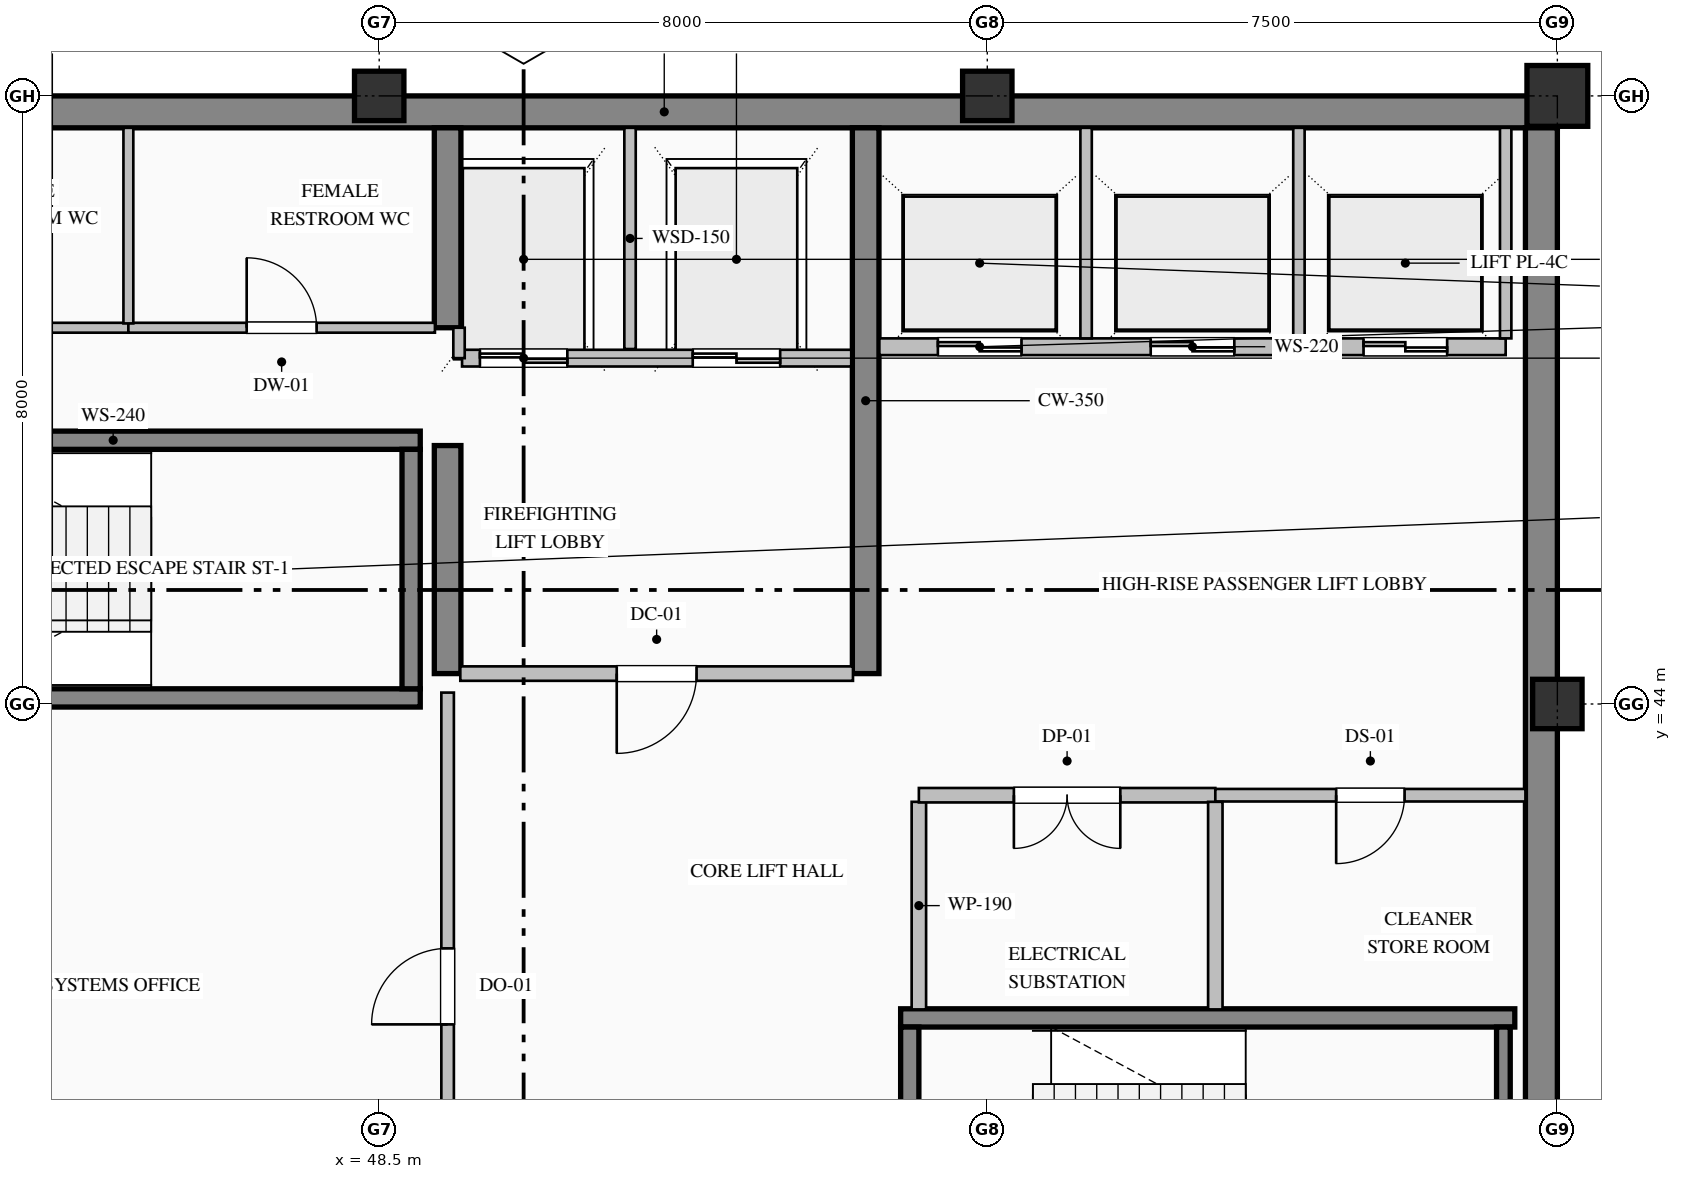
"""IFC4 building model, lengths in metres.
Left out: names, types, materials, properties, quantities, classifications, styles, units other than length and angle.
Written with IfcOpenShell. Run it as: python <this file> out.ifc"""

import sys

from ifc_helpers import new_model, si_unit, direction, frame, frame_2d, origin, origin_2d, place, context, subcontext, project, spatial, rectangle, hollow_rectangle, extrude, element, fill, save


model = new_model("IFC4")
c1 = context("Model", 3, precision=1e-05, world=origin(), true_north=direction((0.0, 1.0)))
c2 = subcontext(c1, "Body", "Model", "MODEL_VIEW")
j1 = project(units=[si_unit("LENGTHUNIT", "METRE"), si_unit("PLANEANGLEUNIT", "RADIAN")], contexts=[c1])
p1 = place(None, origin())
s1 = spatial("IfcSite", under=j1, at=p1, CompositionType="ELEMENT")
p2 = place(p1, origin())
s2 = spatial("IfcBuilding", under=s1, at=p2, CompositionType="ELEMENT")
p3 = place(p2, frame((0.0, 0.0, 363.2)))
s3 = spatial("IfcBuildingStorey", under=s2, at=p3, CompositionType="ELEMENT", Elevation=363.2)
p4 = place(p3, frame((40.5, 51.79, 0.0), z_axis=(0.0, 0.0, 1.0), x_axis=(1.0, 0.0, 0.0)))
e1 = element("IfcWall", 1, at=p4, inside=s3, PredefinedType="SHEAR", context=c2, shape_type="SweptSolid", body=[
    extrude(rectangle(XDim=23.5, YDim=0.42, at=frame_2d((11.75, 0.0))), origin(), (0.0, 0.0, 1.0), 3.58),
])
p5 = place(p3, frame((63.79, 36.32, 0.0), z_axis=(0.0, 0.0, 1.0), x_axis=(0.0, 1.0, 0.0)))
e2 = element("IfcWall", 2, at=p5, inside=s3, PredefinedType="SHEAR", context=c2, shape_type="SweptSolid", body=[
    extrude(rectangle(XDim=15.26, YDim=0.42, at=frame_2d((7.63, 0.0))), origin(), (0.0, 0.0, 1.0), 3.58),
])
p6 = place(p3, frame((49.4, 44.4, 0.0), z_axis=(0.0, 0.0, 1.0), x_axis=(0.0, 1.0, 0.0)))
e3 = element("IfcWall", 3, at=p6, inside=s3, PredefinedType="SHEAR", context=c2, shape_type="SweptSolid", body=[
    extrude(rectangle(XDim=3.0, YDim=0.35, at=frame_2d((1.5, 0.0))), origin(), (0.0, 0.0, 1.0), 3.58),
])
p7 = place(p3, frame((49.4, 48.95, 0.0), z_axis=(0.0, 0.0, 1.0), x_axis=(0.0, 1.0, 0.0)))
e4 = element("IfcWall", 4, at=p7, inside=s3, PredefinedType="SHEAR", context=c2, shape_type="SweptSolid", body=[
    extrude(rectangle(XDim=2.63, YDim=0.35, at=frame_2d((1.315, 0.0))), origin(), (0.0, 0.0, 1.0), 3.58),
])
p8 = place(p3, frame((54.9, 44.4, 0.0), z_axis=(0.0, 0.0, 1.0), x_axis=(0.0, 1.0, 0.0)))
e5 = element("IfcWall", 5, at=p8, inside=s3, PredefinedType="SHEAR", context=c2, shape_type="SweptSolid", body=[
    extrude(rectangle(XDim=7.18, YDim=0.35, at=frame_2d((3.59, 0.0))), origin(), (0.0, 0.0, 1.0), 3.58),
])
for number, where, z_axis, x_axis in (
    (6, (48.5, 52.0, 0.0), (0.0, 0.0, 1.0), (1.0, 0.0, 0.0)),
    (7, (56.5, 52.0, 0.0), (0.0, 0.0, 1.0), (1.0, 0.0, 0.0)),
    (8, (64.0, 44.0, 0.0), (0.0, 0.0, 1.0), (1.0, 0.0, 0.0)),
):
    element("IfcColumn", number, at=place(p3, frame(where, z_axis=z_axis, x_axis=x_axis)), inside=s3, PredefinedType="COLUMN", context=c2, shape_type="SweptSolid", body=[
        extrude(hollow_rectangle(XDim=0.65, YDim=0.65, WallThickness=0.028, at=origin_2d()), origin(), (0.0, 0.0, 1.0), 4.0),
    ])
p9 = place(p3, frame((64.0, 52.0, 0.0), z_axis=(0.0, 0.0, 1.0), x_axis=(1.0, 0.0, 0.0)))
e9 = element("IfcColumn", 9, at=p9, inside=s3, PredefinedType="COLUMN", context=c2, shape_type="SweptSolid", body=[
    extrude(hollow_rectangle(XDim=0.8, YDim=0.8, WallThickness=0.032, at=origin_2d()), origin(), (0.0, 0.0, 1.0), 4.0),
])
for number, where, z_axis, x_axis in (
    (10, (40.96, 47.47, 0.0), (0.0, 0.0, 1.0), (1.0, 0.0, 0.0)),
    (11, (49.04, 44.08, 0.0), (0.0, 0.0, 1.0), (-1.0, 0.0, 0.0)),
):
    element("IfcWall", number, at=place(p3, frame(where, z_axis=z_axis, x_axis=x_axis)), inside=s3, PredefinedType="SOLIDWALL", context=c2, shape_type="SweptSolid", body=[
        extrude(rectangle(XDim=8.08, YDim=0.24, at=frame_2d((4.04, 0.0))), origin(), (0.0, 0.0, 1.0), 4.0),
    ])
p10 = place(p3, frame((48.92, 44.2, 0.0), z_axis=(0.0, 0.0, 1.0), x_axis=(0.0, 1.0, 0.0)))
e12 = element("IfcWall", 12, at=p10, inside=s3, PredefinedType="SOLIDWALL", context=c2, shape_type="SweptSolid", body=[
    extrude(rectangle(XDim=3.15, YDim=0.24, at=frame_2d((1.575, 0.0))), origin(), (0.0, 0.0, 1.0), 4.0),
])
p11 = place(p3, frame((55.36, 39.87, 0.0), z_axis=(0.0, 0.0, 1.0), x_axis=(1.0, 0.0, 0.0)))
e13 = element("IfcWall", 13, at=p11, inside=s3, PredefinedType="SOLIDWALL", context=c2, shape_type="SweptSolid", body=[
    extrude(rectangle(XDim=8.08, YDim=0.24, at=frame_2d((4.04, 0.0))), origin(), (0.0, 0.0, 1.0), 4.0),
])
p12 = place(p3, frame((55.48, 39.75, 0.0), z_axis=(0.0, 0.0, 1.0), x_axis=(0.0, -1.0, 0.0)))
e14 = element("IfcWall", 14, at=p12, inside=s3, PredefinedType="SOLIDWALL", context=c2, shape_type="SweptSolid", body=[
    extrude(rectangle(XDim=3.15, YDim=0.24, at=frame_2d((1.575, 0.0))), origin(), (0.0, 0.0, 1.0), 4.0),
])
p13 = place(p12, frame((1.0, 0.0, 0.0)))
e15 = element("IfcOpeningElement", 15, at=p13, cuts=e14, PredefinedType="OPENING", context=c2, shape_type="SweptSolid", body=[
    extrude(rectangle(XDim=1.15, YDim=2.2, at=frame_2d((0.575, 1.1))), frame((0.0, 0.13, 0.0), z_axis=(0.0, -1.0, 0.0), x_axis=(1.0, 0.0, 0.0)), (0.0, 0.0, 1.0), 0.26),
])
p14 = place(p3, frame((63.29, 36.6, 0.0), z_axis=(0.0, 0.0, 1.0), x_axis=(0.0, 1.0, 0.0)))
e16 = element("IfcWall", 16, at=p14, inside=s3, PredefinedType="SOLIDWALL", context=c2, shape_type="SweptSolid", body=[
    extrude(rectangle(XDim=3.15, YDim=0.18, at=frame_2d((1.575, 0.0))), origin(), (0.0, 0.0, 1.0), 4.0),
])
p15 = place(p3, frame((54.71, 48.55, 0.0), z_axis=(0.0, 0.0, 1.0), x_axis=(-1.0, 0.0, 0.0)))
e17 = element("IfcWall", 17, at=p15, inside=s3, PredefinedType="PARTITIONING", context=c2, shape_type="SweptSolid", body=[
    extrude(rectangle(XDim=5.12, YDim=0.22, at=frame_2d((2.56, 0.0))), origin(), (0.0, 0.0, 1.0), 3.58),
])
p16 = place(p15, frame((3.735, 0.0, 0.0)))
e18 = element("IfcOpeningElement", 18, at=p16, cuts=e17, PredefinedType="OPENING", context=c2, shape_type="SweptSolid", body=[
    extrude(rectangle(XDim=1.15, YDim=2.2, at=frame_2d((0.575, 1.1))), frame((0.0, 0.12, 0.0), z_axis=(0.0, -1.0, 0.0), x_axis=(1.0, 0.0, 0.0)), (0.0, 0.0, 1.0), 0.24),
])
p17 = place(p15, frame((0.935, 0.0, 0.0)))
e19 = element("IfcOpeningElement", 19, at=p17, cuts=e17, PredefinedType="OPENING", context=c2, shape_type="SweptSolid", body=[
    extrude(rectangle(XDim=1.15, YDim=2.2, at=frame_2d((0.575, 1.1))), frame((0.0, 0.12, 0.0), z_axis=(0.0, -1.0, 0.0), x_axis=(1.0, 0.0, 0.0)), (0.0, 0.0, 1.0), 0.24),
])
p18 = place(p3, frame((51.8, 48.67, 0.0), z_axis=(0.0, 0.0, 1.0), x_axis=(0.0, 1.0, 0.0)))
e20 = element("IfcWall", 20, at=p18, inside=s3, PredefinedType="PARTITIONING", context=c2, shape_type="SweptSolid", body=[
    extrude(rectangle(XDim=2.91, YDim=0.15, at=frame_2d((1.455, 0.0))), origin(), (0.0, 0.0, 1.0), 3.58),
])
p19 = place(p3, frame((49.55, 48.55, 0.0), z_axis=(0.0, 0.0, 1.0), x_axis=(0.0, 1.0, 0.0)))
e21 = element("IfcWall", 21, at=p19, inside=s3, PredefinedType="PARTITIONING", context=c2, shape_type="SweptSolid", body=[
    extrude(rectangle(XDim=0.4, YDim=0.15, at=frame_2d((0.2, 0.0))), origin(), (0.0, 0.0, 1.0), 3.58),
])
p20 = place(p3, frame((63.32, 48.7, 0.0), z_axis=(0.0, 0.0, 1.0), x_axis=(-1.0, 0.0, 0.0)))
e22 = element("IfcWall", 22, at=p20, inside=s3, PredefinedType="PARTITIONING", context=c2, shape_type="SweptSolid", body=[
    extrude(rectangle(XDim=8.24, YDim=0.22, at=frame_2d((4.12, 0.0))), origin(), (0.0, 0.0, 1.0), 3.58),
])
p21 = place(p20, frame((6.37, 0.0, 0.0)))
e23 = element("IfcOpeningElement", 23, at=p21, cuts=e22, PredefinedType="OPENING", context=c2, shape_type="SweptSolid", body=[
    extrude(rectangle(XDim=1.1, YDim=2.2, at=frame_2d((0.55, 1.1))), frame((0.0, 0.12, 0.0), z_axis=(0.0, -1.0, 0.0), x_axis=(1.0, 0.0, 0.0)), (0.0, 0.0, 1.0), 0.24),
])
p22 = place(p20, frame((3.57, 0.0, 0.0)))
e24 = element("IfcOpeningElement", 24, at=p22, cuts=e22, PredefinedType="OPENING", context=c2, shape_type="SweptSolid", body=[
    extrude(rectangle(XDim=1.1, YDim=2.2, at=frame_2d((0.55, 1.1))), frame((0.0, 0.12, 0.0), z_axis=(0.0, -1.0, 0.0), x_axis=(1.0, 0.0, 0.0)), (0.0, 0.0, 1.0), 0.24),
])
p23 = place(p20, frame((0.77, 0.0, 0.0)))
e25 = element("IfcOpeningElement", 25, at=p23, cuts=e22, PredefinedType="OPENING", context=c2, shape_type="SweptSolid", body=[
    extrude(rectangle(XDim=1.1, YDim=2.2, at=frame_2d((0.55, 1.1))), frame((0.0, 0.12, 0.0), z_axis=(0.0, -1.0, 0.0), x_axis=(1.0, 0.0, 0.0)), (0.0, 0.0, 1.0), 0.24),
])
for number, where, z_axis, x_axis in (
    (26, (57.8, 48.81, 0.0), (0.0, 0.0, 1.0), (0.0, 1.0, 0.0)),
    (27, (60.6, 48.81, 0.0), (0.0, 0.0, 1.0), (0.0, 1.0, 0.0)),
    (28, (63.32, 48.81, 0.0), (0.0, 0.0, 1.0), (0.0, 1.0, 0.0)),
):
    element("IfcWall", number, at=place(p3, frame(where, z_axis=z_axis, x_axis=x_axis)), inside=s3, PredefinedType="PARTITIONING", context=c2, shape_type="SweptSolid", body=[
        extrude(rectangle(XDim=2.77, YDim=0.15, at=frame_2d((1.385, 0.0))), origin(), (0.0, 0.0, 1.0), 3.58),
    ])
p24 = place(p3, frame((40.92, 48.95, 0.0), z_axis=(0.0, 0.0, 1.0), x_axis=(1.0, 0.0, 0.0)))
e29 = element("IfcWall", 29, at=p24, inside=s3, PredefinedType="PARTITIONING", context=c2, shape_type="SweptSolid", body=[
    extrude(rectangle(XDim=4.28, YDim=0.13, at=frame_2d((2.14, 0.0))), origin(), (0.0, 0.0, 1.0), 3.58),
])
p25 = place(p24, frame((1.68, 0.0, 0.0)))
e30 = element("IfcOpeningElement", 30, at=p25, cuts=e29, PredefinedType="OPENING", context=c2, shape_type="SweptSolid", body=[
    extrude(rectangle(XDim=0.92, YDim=2.15, at=frame_2d((0.46, 1.075))), frame((0.0, 0.075, 0.0), z_axis=(0.0, -1.0, 0.0), x_axis=(1.0, 0.0, 0.0)), (0.0, 0.0, 1.0), 0.15),
])
p26 = place(p3, frame((45.2, 48.95, 0.0), z_axis=(0.0, 0.0, 1.0), x_axis=(1.0, 0.0, 0.0)))
e31 = element("IfcWall", 31, at=p26, inside=s3, PredefinedType="PARTITIONING", context=c2, shape_type="SweptSolid", body=[
    extrude(rectangle(XDim=4.033, YDim=0.13, at=frame_2d((2.017, 0.0))), origin(), (0.0, 0.0, 1.0), 3.58),
])
p27 = place(p26, frame((1.556, 0.0, 0.0)))
e32 = element("IfcOpeningElement", 32, at=p27, cuts=e31, PredefinedType="OPENING", context=c2, shape_type="SweptSolid", body=[
    extrude(rectangle(XDim=0.92, YDim=2.15, at=frame_2d((0.46, 1.075))), frame((0.0, 0.075, 0.0), z_axis=(0.0, -1.0, 0.0), x_axis=(1.0, 0.0, 0.0)), (0.0, 0.0, 1.0), 0.15),
])
p28 = place(p3, frame((54.733, 44.4, 0.0), z_axis=(0.0, 0.0, 1.0), x_axis=(-1.0, 0.0, 0.0)))
e33 = element("IfcWall", 33, at=p28, inside=s3, PredefinedType="PARTITIONING", context=c2, shape_type="SweptSolid", body=[
    extrude(rectangle(XDim=5.166, YDim=0.19, at=frame_2d((2.583, 0.0))), origin(), (0.0, 0.0, 1.0), 3.58),
])
p29 = place(p28, frame((2.058, 0.0, 0.0)))
e34 = element("IfcOpeningElement", 34, at=p29, cuts=e33, PredefinedType="OPENING", context=c2, shape_type="SweptSolid", body=[
    extrude(rectangle(XDim=1.05, YDim=2.15, at=frame_2d((0.525, 1.075))), frame((0.0, 0.105, 0.0), z_axis=(0.0, -1.0, 0.0), x_axis=(1.0, 0.0, 0.0)), (0.0, 0.0, 1.0), 0.21),
])
p30 = place(p3, frame((49.4, 36.42, 0.0), z_axis=(0.0, 0.0, 1.0), x_axis=(0.0, 1.0, 0.0)))
e35 = element("IfcWall", 35, at=p30, inside=s3, PredefinedType="PARTITIONING", context=c2, shape_type="SweptSolid", body=[
    extrude(rectangle(XDim=7.73, YDim=0.165, at=frame_2d((3.865, 0.0))), origin(), (0.0, 0.0, 1.0), 2.822),
])
p31 = place(p30, frame((3.365, 0.0, 0.0)))
e36 = element("IfcOpeningElement", 36, at=p31, cuts=e35, PredefinedType="OPENING", context=c2, shape_type="SweptSolid", body=[
    extrude(rectangle(XDim=1.0, YDim=2.15, at=frame_2d((0.5, 1.075))), frame((0.0, 0.093, 0.0), z_axis=(0.0, -1.0, 0.0), x_axis=(1.0, 0.0, 0.0)), (0.0, 0.0, 1.0), 0.185),
])
p32 = place(p3, frame((55.6, 42.713, 0.0), z_axis=(0.0, 0.0, 1.0), x_axis=(0.0, -1.0, 0.0)))
e37 = element("IfcWall", 37, at=p32, inside=s3, PredefinedType="PARTITIONING", context=c2, shape_type="SweptSolid", body=[
    extrude(rectangle(XDim=2.731, YDim=0.19, at=frame_2d((1.365, 0.0))), origin(), (0.0, 0.0, 1.0), 3.58),
])
p33 = place(p3, frame((59.5, 42.8, 0.0), z_axis=(0.0, 0.0, 1.0), x_axis=(-1.0, 0.0, 0.0)))
e38 = element("IfcWall", 38, at=p33, inside=s3, PredefinedType="PARTITIONING", context=c2, shape_type="SweptSolid", body=[
    extrude(rectangle(XDim=3.9, YDim=0.19, at=frame_2d((1.95, 0.0))), origin(), (0.0, 0.0, 1.0), 3.58),
])
p34 = place(p33, frame((1.25, 0.0, 0.0)))
e39 = element("IfcOpeningElement", 39, at=p34, cuts=e38, PredefinedType="OPENING", context=c2, shape_type="SweptSolid", body=[
    extrude(rectangle(XDim=1.4, YDim=2.25, at=frame_2d((0.7, 1.125))), frame((0.0, 0.105, 0.0), z_axis=(0.0, -1.0, 0.0), x_axis=(1.0, 0.0, 0.0)), (0.0, 0.0, 1.0), 0.21),
])
p35 = place(p3, frame((63.58, 42.8, 0.0), z_axis=(0.0, 0.0, 1.0), x_axis=(-1.0, 0.0, 0.0)))
e40 = element("IfcWall", 40, at=p35, inside=s3, PredefinedType="PARTITIONING", context=c2, shape_type="SweptSolid", body=[
    extrude(rectangle(XDim=4.08, YDim=0.165, at=frame_2d((2.04, 0.0))), origin(), (0.0, 0.0, 1.0), 3.58),
])
p36 = place(p35, frame((1.59, 0.0, 0.0)))
e41 = element("IfcOpeningElement", 41, at=p36, cuts=e40, PredefinedType="OPENING", context=c2, shape_type="SweptSolid", body=[
    extrude(rectangle(XDim=0.9, YDim=2.15, at=frame_2d((0.45, 1.075))), frame((0.0, 0.093, 0.0), z_axis=(0.0, -1.0, 0.0), x_axis=(1.0, 0.0, 0.0)), (0.0, 0.0, 1.0), 0.185),
])
p37 = place(p3, frame((45.2, 51.58, 0.0), z_axis=(0.0, 0.0, 1.0), x_axis=(0.0, -1.0, 0.0)))
e42 = element("IfcWall", 42, at=p37, inside=s3, PredefinedType="PARTITIONING", context=c2, shape_type="SweptSolid", body=[
    extrude(rectangle(XDim=2.573, YDim=0.13, at=frame_2d((1.287, 0.0))), origin(), (0.0, 0.0, 1.0), 3.58),
])
p38 = place(p3, frame((59.5, 42.713, 0.0), z_axis=(0.0, 0.0, 1.0), x_axis=(0.0, -1.0, 0.0)))
e43 = element("IfcWall", 43, at=p38, inside=s3, PredefinedType="PARTITIONING", context=c2, shape_type="SweptSolid", body=[
    extrude(rectangle(XDim=2.731, YDim=0.19, at=frame_2d((1.365, 0.0))), origin(), (0.0, 0.0, 1.0), 3.58),
])
p39 = place(p16, origin())
e44 = element("IfcDoor", 44, at=p39, inside=s3, OperationType="DOUBLE_DOOR_SLIDING", PredefinedType="DOOR", context=c2, shape_type="SweptSolid", body=[
    extrude(rectangle(XDim=1.15, YDim=2.2, at=frame_2d((0.575, 1.1))), frame((0.0, 0.025, 0.0), z_axis=(0.0, -1.0, 0.0), x_axis=(1.0, 0.0, 0.0)), (0.0, 0.0, 1.0), 0.05),
])
fill(e18, e44)
p40 = place(p17, origin())
e45 = element("IfcDoor", 45, at=p40, inside=s3, OperationType="DOUBLE_DOOR_SLIDING", PredefinedType="DOOR", context=c2, shape_type="SweptSolid", body=[
    extrude(rectangle(XDim=1.15, YDim=2.2, at=frame_2d((0.575, 1.1))), frame((0.0, 0.025, 0.0), z_axis=(0.0, -1.0, 0.0), x_axis=(1.0, 0.0, 0.0)), (0.0, 0.0, 1.0), 0.05),
])
fill(e19, e45)
p41 = place(p21, origin())
e46 = element("IfcDoor", 46, at=p41, inside=s3, OperationType="DOUBLE_DOOR_SLIDING", PredefinedType="DOOR", context=c2, shape_type="SweptSolid", body=[
    extrude(rectangle(XDim=1.1, YDim=2.2, at=frame_2d((0.55, 1.1))), frame((0.0, 0.025, 0.0), z_axis=(0.0, -1.0, 0.0), x_axis=(1.0, 0.0, 0.0)), (0.0, 0.0, 1.0), 0.05),
])
fill(e23, e46)
p42 = place(p22, origin())
e47 = element("IfcDoor", 47, at=p42, inside=s3, OperationType="DOUBLE_DOOR_SLIDING", PredefinedType="DOOR", context=c2, shape_type="SweptSolid", body=[
    extrude(rectangle(XDim=1.1, YDim=2.2, at=frame_2d((0.55, 1.1))), frame((0.0, 0.025, 0.0), z_axis=(0.0, -1.0, 0.0), x_axis=(1.0, 0.0, 0.0)), (0.0, 0.0, 1.0), 0.05),
])
fill(e24, e47)
p43 = place(p23, origin())
e48 = element("IfcDoor", 48, at=p43, inside=s3, OperationType="DOUBLE_DOOR_SLIDING", PredefinedType="DOOR", context=c2, shape_type="SweptSolid", body=[
    extrude(rectangle(XDim=1.1, YDim=2.2, at=frame_2d((0.55, 1.1))), frame((0.0, 0.025, 0.0), z_axis=(0.0, -1.0, 0.0), x_axis=(1.0, 0.0, 0.0)), (0.0, 0.0, 1.0), 0.05),
])
fill(e25, e48)
p44 = place(p29, origin())
e49 = element("IfcDoor", 49, at=p44, inside=s3, OperationType="SINGLE_SWING_RIGHT", PredefinedType="DOOR", context=c2, shape_type="SweptSolid", body=[
    extrude(rectangle(XDim=1.05, YDim=2.15, at=frame_2d((0.525, 1.075))), frame((0.0, 0.025, 0.0), z_axis=(0.0, -1.0, 0.0), x_axis=(1.0, 0.0, 0.0)), (0.0, 0.0, 1.0), 0.05),
])
fill(e34, e49)
p45 = place(p31, origin())
e50 = element("IfcDoor", 50, at=p45, inside=s3, OperationType="SINGLE_SWING_LEFT", PredefinedType="DOOR", context=c2, shape_type="SweptSolid", body=[
    extrude(rectangle(XDim=1.0, YDim=2.15, at=frame_2d((0.5, 1.075))), frame((0.0, 0.025, 0.0), z_axis=(0.0, -1.0, 0.0), x_axis=(1.0, 0.0, 0.0)), (0.0, 0.0, 1.0), 0.05),
])
fill(e36, e50)
p46 = place(p27, origin())
e51 = element("IfcDoor", 51, at=p46, inside=s3, OperationType="SINGLE_SWING_LEFT", PredefinedType="DOOR", context=c2, shape_type="SweptSolid", body=[
    extrude(rectangle(XDim=0.92, YDim=2.15, at=frame_2d((0.46, 1.075))), frame((0.0, 0.025, 0.0), z_axis=(0.0, -1.0, 0.0), x_axis=(1.0, 0.0, 0.0)), (0.0, 0.0, 1.0), 0.05),
])
fill(e32, e51)
p47 = place(p34, origin())
e52 = element("IfcDoor", 52, at=p47, inside=s3, OperationType="DOUBLE_DOOR_SINGLE_SWING", PredefinedType="DOOR", context=c2, shape_type="SweptSolid", body=[
    extrude(rectangle(XDim=1.4, YDim=2.25, at=frame_2d((0.7, 1.125))), frame((0.0, 0.025, 0.0), z_axis=(0.0, -1.0, 0.0), x_axis=(1.0, 0.0, 0.0)), (0.0, 0.0, 1.0), 0.05),
])
fill(e39, e52)
p48 = place(p36, origin())
e53 = element("IfcDoor", 53, at=p48, inside=s3, OperationType="SINGLE_SWING_RIGHT", PredefinedType="DOOR", context=c2, shape_type="SweptSolid", body=[
    extrude(rectangle(XDim=0.9, YDim=2.15, at=frame_2d((0.45, 1.075))), frame((0.0, 0.025, 0.0), z_axis=(0.0, -1.0, 0.0), x_axis=(1.0, 0.0, 0.0)), (0.0, 0.0, 1.0), 0.05),
])
fill(e41, e53)
save(model, sys.argv[1])
